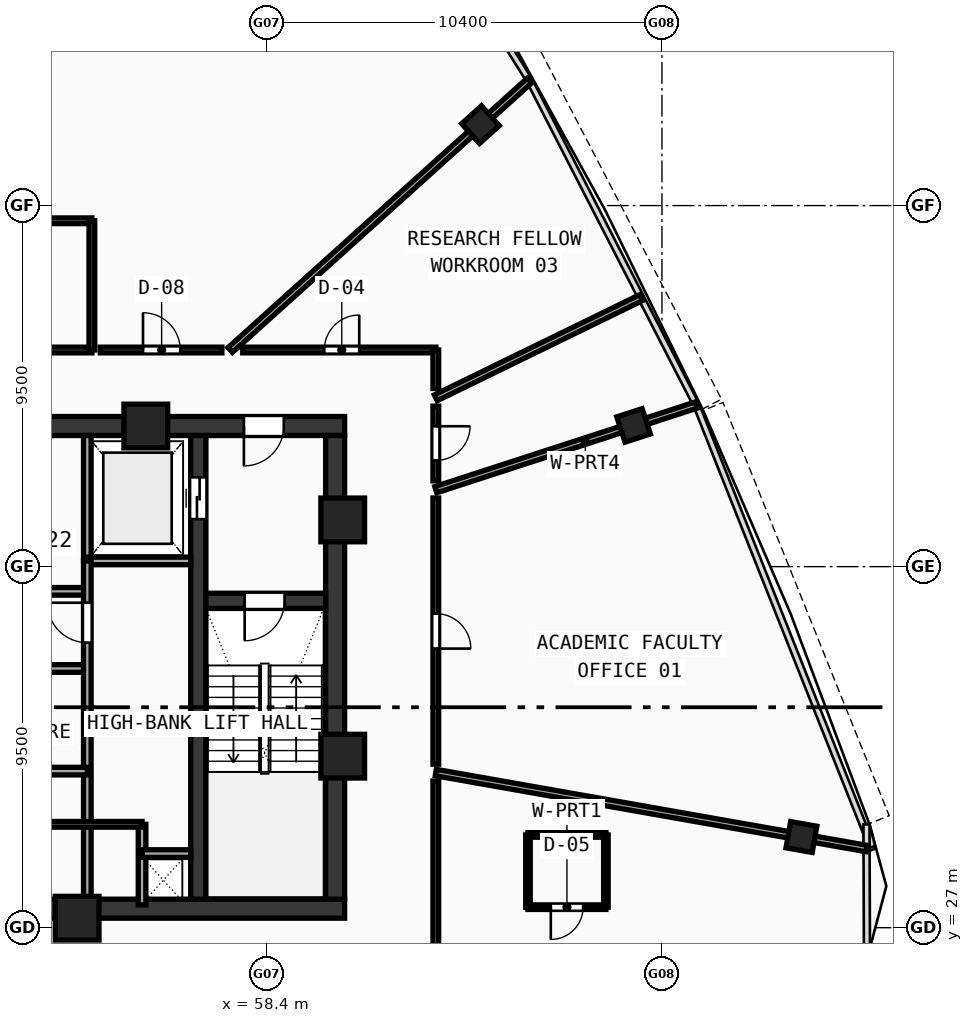
"""IFC4 building model, lengths in metres.
Left out: names, types, materials, properties, quantities, classifications, styles, units other than length and angle.
Written with IfcOpenShell. Run it as: python <this file> out.ifc"""

import sys

from ifc_helpers import new_model, si_unit, direction, frame, frame_2d, origin, origin_with_axes, origin_2d, place, context, subcontext, project, spatial, rectangle, hollow_rectangle, extrude, source, transform, mapped, element, fill, save


model = new_model("IFC4")
c1 = context("Model", 3, precision=1e-05, world=origin(), true_north=direction((0.0, 1.0)))
c2 = subcontext(c1, "Body", "Model", "MODEL_VIEW")
j1 = project(units=[si_unit("LENGTHUNIT", "METRE"), si_unit("PLANEANGLEUNIT", "RADIAN")], contexts=[c1])
p1 = place(None, origin())
s1 = spatial("IfcSite", under=j1, at=p1, CompositionType="ELEMENT")
p2 = place(p1, origin())
s2 = spatial("IfcBuilding", under=s1, at=p2, CompositionType="ELEMENT")
p3 = place(p2, frame((0.0, 0.0, 363.01)))
s3 = spatial("IfcBuildingStorey", under=s2, at=p3, CompositionType="ELEMENT", Elevation=363.01)
p4 = place(p3, frame((35.55, 27.5, 0.0), z_axis=(0.0, 0.0, 1.0), x_axis=(1.0, 0.0, 0.0)))
e1 = element("IfcWall", 1, at=p4, inside=s3, PredefinedType="SHEAR", context=c2, shape_type="SweptSolid", body=[
    extrude(rectangle(XDim=24.9, YDim=0.5, at=frame_2d((12.45, 0.0))), origin(), (0.0, 0.0, 1.0), 3.47),
])
p5 = place(p3, frame((49.2, 40.2, 0.0), z_axis=(0.0, 0.0, 1.0), x_axis=(1.0, 0.0, 0.0)))
e2 = element("IfcWall", 2, at=p5, inside=s3, PredefinedType="SHEAR", context=c2, shape_type="SweptSolid", body=[
    extrude(rectangle(XDim=11.25, YDim=0.5, at=frame_2d((5.625, 0.0))), origin(), (0.0, 0.0, 1.0), 3.47),
])
p6 = place(p5, frame((8.6, 0.0, 0.0)))
e3 = element("IfcOpeningElement", 3, at=p6, cuts=e2, PredefinedType="OPENING", context=c2, shape_type="SweptSolid", body=[
    extrude(rectangle(XDim=1.05, YDim=2.1, at=frame_2d((0.525, 1.05))), frame((0.0, 0.26, 0.0), z_axis=(0.0, -1.0, 0.0), x_axis=(1.0, 0.0, 0.0)), (0.0, 0.0, 1.0), 0.52),
])
p7 = place(p3, frame((60.2, 27.75, 0.0), z_axis=(0.0, 0.0, 1.0), x_axis=(0.0, 1.0, 0.0)))
e4 = element("IfcWall", 4, at=p7, inside=s3, PredefinedType="SHEAR", context=c2, shape_type="SweptSolid", body=[
    extrude(rectangle(XDim=12.2, YDim=0.5, at=frame_2d((6.1, 0.0))), origin(), (0.0, 0.0, 1.0), 3.47),
])
p8 = place(p3, frame((56.6, 27.75, 0.0), z_axis=(0.0, 0.0, 1.0), x_axis=(0.0, 1.0, 0.0)))
e5 = element("IfcWall", 5, at=p8, inside=s3, PredefinedType="SHEAR", context=c2, shape_type="SweptSolid", body=[
    extrude(rectangle(XDim=12.2, YDim=0.4, at=frame_2d((6.1, 0.0))), origin(), (0.0, 0.0, 1.0), 3.47),
])
p9 = place(p8, frame((10.0, 0.0, 0.0)))
e6 = element("IfcOpeningElement", 6, at=p9, cuts=e5, PredefinedType="OPENING", context=c2, shape_type="SweptSolid", body=[
    extrude(rectangle(XDim=1.1, YDim=2.1, at=frame_2d((0.55, 1.05))), frame((0.0, 0.21, 0.0), z_axis=(0.0, -1.0, 0.0), x_axis=(1.0, 0.0, 0.0)), (0.0, 0.0, 1.0), 0.42),
])
p10 = place(p3, frame((56.8, 35.6, 0.0), z_axis=(0.0, 0.0, 1.0), x_axis=(1.0, 0.0, 0.0)))
e7 = element("IfcWall", 7, at=p10, inside=s3, PredefinedType="SHEAR", context=c2, shape_type="SweptSolid", body=[
    extrude(rectangle(XDim=3.15, YDim=0.4, at=frame_2d((1.575, 0.0))), origin(), (0.0, 0.0, 1.0), 3.47),
])
p11 = place(p10, frame((1.02, 0.0, 0.0)))
e8 = element("IfcOpeningElement", 8, at=p11, cuts=e7, PredefinedType="OPENING", context=c2, shape_type="SweptSolid", body=[
    extrude(rectangle(XDim=1.05, YDim=2.1, at=frame_2d((0.525, 1.05))), frame((0.0, 0.21, 0.0), z_axis=(0.0, -1.0, 0.0), x_axis=(1.0, 0.0, 0.0)), (0.0, 0.0, 1.0), 0.42),
])
m1 = source(origin(), c2, "Body", "SweptSolid", [
    extrude(hollow_rectangle(XDim=1.15, YDim=1.15, WallThickness=0.048, at=origin_2d()), origin(), (0.0, 0.0, 1.0), 3.73),
])
for number, where, z_axis, x_axis in (
    (9, (53.412, 27.25, -0.26), (0.0, 0.0, 1.0), (1.0, 0.0, 0.0)),
    (10, (60.4, 31.513, -0.26), (0.0, 0.0, 1.0), (1.0, 0.0, 0.0)),
    (11, (60.4, 37.729, -0.26), (0.0, 0.0, 1.0), (1.0, 0.0, 0.0)),
    (12, (55.219, 40.2, -0.26), (0.0, 0.0, 1.0), (1.0, 0.0, 0.0)),
):
    element("IfcColumn", number, at=place(p3, frame(where, z_axis=z_axis, x_axis=x_axis)), inside=s3, PredefinedType="COLUMN", context=c2, shape_type="MappedRepresentation", body=[
        mapped(m1, transform((0.0, 0.0, 0.0), scale=1.0)),
    ])
m2 = source(origin(), c2, "Body", "SweptSolid", [
    extrude(hollow_rectangle(XDim=0.7, YDim=0.7, WallThickness=0.026, at=origin_2d()), origin(), (0.0, 0.0, 1.0), 3.73),
])
for number, where, z_axis, x_axis in (
    (13, (72.47, 29.385, -0.26), (0.0, 0.0, 1.0), (0.174, 0.985, 0.0)),
    (14, (68.053, 40.216, -0.26), (0.0, 0.0, 1.0), (-0.309, 0.951, 0.0)),
    (15, (64.025, 48.129, -0.26), (0.0, 0.0, 1.0), (-0.669, 0.743, 0.0)),
):
    element("IfcColumn", number, at=place(p3, frame(where, z_axis=z_axis, x_axis=x_axis)), inside=s3, PredefinedType="COLUMN", context=c2, shape_type="MappedRepresentation", body=[
        mapped(m2, transform((0.0, 0.0, 0.0), scale=1.0)),
    ])
p12 = place(p3, frame((53.68, 36.65, 0.0), z_axis=(0.0, 0.0, 1.0), x_axis=(0.0, 1.0, 0.0)))
e16 = element("IfcWall", 16, at=p12, inside=s3, PredefinedType="SOLIDWALL", context=c2, shape_type="SweptSolid", body=[
    extrude(rectangle(XDim=3.3, YDim=0.2, at=frame_2d((1.65, 0.0))), origin(), (0.0, 0.0, 1.0), 3.47),
])
p13 = place(p3, frame((53.68, 36.65, 0.0), z_axis=(0.0, 0.0, 1.0), x_axis=(1.0, 0.0, 0.0)))
e17 = element("IfcWall", 17, at=p13, inside=s3, PredefinedType="SOLIDWALL", context=c2, shape_type="SweptSolid", body=[
    extrude(rectangle(XDim=2.72, YDim=0.2, at=frame_2d((1.36, 0.0))), origin(), (0.0, 0.0, 1.0), 3.47),
])
p14 = place(p3, frame((48.95, 35.85, 0.0), z_axis=(0.0, 0.0, 1.0), x_axis=(1.0, 0.0, 0.0)))
e18 = element("IfcWall", 18, at=p14, inside=s3, PredefinedType="SOLIDWALL", context=c2, shape_type="SweptSolid", body=[
    extrude(rectangle(XDim=4.73, YDim=0.2, at=frame_2d((2.365, 0.0))), origin(), (0.0, 0.0, 1.0), 3.47),
])
p15 = place(p14, frame((1.8, 0.0, 0.0)))
e19 = element("IfcOpeningElement", 19, at=p15, cuts=e18, PredefinedType="OPENING", context=c2, shape_type="SweptSolid", body=[
    extrude(rectangle(XDim=0.9, YDim=2.1, at=frame_2d((0.45, 1.05))), frame((0.0, 0.11, 0.0), z_axis=(0.0, -1.0, 0.0), x_axis=(1.0, 0.0, 0.0)), (0.0, 0.0, 1.0), 0.22),
])
p16 = place(p3, frame((43.85, 33.82, 0.0), z_axis=(0.0, 0.0, 1.0), x_axis=(1.0, 0.0, 0.0)))
e20 = element("IfcWall", 20, at=p16, inside=s3, PredefinedType="SOLIDWALL", context=c2, shape_type="SweptSolid", body=[
    extrude(rectangle(XDim=9.83, YDim=0.2, at=frame_2d((4.915, 0.0))), origin(), (0.0, 0.0, 1.0), 3.47),
])
p17 = place(p16, frame((1.2, 0.0, 0.0)))
e21 = element("IfcOpeningElement", 21, at=p17, cuts=e20, PredefinedType="OPENING", context=c2, shape_type="SweptSolid", body=[
    extrude(rectangle(XDim=0.9, YDim=2.1, at=frame_2d((0.45, 1.05))), frame((0.0, 0.11, 0.0), z_axis=(0.0, -1.0, 0.0), x_axis=(1.0, 0.0, 0.0)), (0.0, 0.0, 1.0), 0.22),
])
p18 = place(p16, frame((4.6, 0.0, 0.0)))
e22 = element("IfcOpeningElement", 22, at=p18, cuts=e20, PredefinedType="OPENING", context=c2, shape_type="SweptSolid", body=[
    extrude(rectangle(XDim=0.9, YDim=2.1, at=frame_2d((0.45, 1.05))), frame((0.0, 0.11, 0.0), z_axis=(0.0, -1.0, 0.0), x_axis=(1.0, 0.0, 0.0)), (0.0, 0.0, 1.0), 0.22),
])
p19 = place(p3, frame((53.68, 27.6, 0.0), z_axis=(0.0, 0.0, 1.0), x_axis=(0.0, 1.0, 0.0)))
e23 = element("IfcWall", 23, at=p19, inside=s3, PredefinedType="SOLIDWALL", context=c2, shape_type="SweptSolid", body=[
    extrude(rectangle(XDim=9.05, YDim=0.2, at=frame_2d((4.525, 0.0))), origin(), (0.0, 0.0, 1.0), 3.47),
])
p20 = place(p19, frame((6.9, 0.0, 0.0)))
e24 = element("IfcOpeningElement", 24, at=p20, cuts=e23, PredefinedType="OPENING", context=c2, shape_type="SweptSolid", body=[
    extrude(rectangle(XDim=1.05, YDim=2.1, at=frame_2d((0.525, 1.05))), frame((0.0, 0.11, 0.0), z_axis=(0.0, -1.0, 0.0), x_axis=(1.0, 0.0, 0.0)), (0.0, 0.0, 1.0), 0.22),
])
p21 = place(p3, frame((43.85, 31.12, 0.0), z_axis=(0.0, 0.0, 1.0), x_axis=(1.0, 0.0, 0.0)))
e25 = element("IfcWall", 25, at=p21, inside=s3, PredefinedType="SOLIDWALL", context=c2, shape_type="SweptSolid", body=[
    extrude(rectangle(XDim=9.83, YDim=0.2, at=frame_2d((4.915, 0.0))), origin(), (0.0, 0.0, 1.0), 3.47),
])
p22 = place(p3, frame((55.12, 27.6, 0.0), z_axis=(0.0, 0.0, 1.0), x_axis=(0.0, 1.0, 0.0)))
e26 = element("IfcWall", 26, at=p22, inside=s3, PredefinedType="SOLIDWALL", context=c2, shape_type="SweptSolid", body=[
    extrude(rectangle(XDim=2.12, YDim=0.2, at=frame_2d((1.06, 0.0))), origin(), (0.0, 0.0, 1.0), 3.47),
])
p23 = place(p3, frame((55.12, 28.95, 0.0), z_axis=(0.0, 0.0, 1.0), x_axis=(1.0, 0.0, 0.0)))
e27 = element("IfcWall", 27, at=p23, inside=s3, PredefinedType="SOLIDWALL", context=c2, shape_type="SweptSolid", body=[
    extrude(rectangle(XDim=1.28, YDim=0.2, at=frame_2d((0.64, 0.0))), origin(), (0.0, 0.0, 1.0), 3.47),
])
p24 = place(p3, frame((51.05, 29.72, 0.0), z_axis=(0.0, 0.0, 1.0), x_axis=(1.0, 0.0, 0.0)))
e28 = element("IfcWall", 28, at=p24, inside=s3, PredefinedType="PARTITIONING", context=c2, shape_type="SweptSolid", body=[
    extrude(rectangle(XDim=4.07, YDim=0.15, at=frame_2d((2.035, 0.0))), origin(), (0.0, 0.0, 1.0), 3.47),
])
p25 = place(p24, frame((0.5, 0.0, 0.0)))
e29 = element("IfcOpeningElement", 29, at=p25, cuts=e28, PredefinedType="OPENING", context=c2, shape_type="SweptSolid", body=[
    extrude(rectangle(XDim=0.9, YDim=2.1, at=frame_2d((0.45, 1.05))), frame((0.0, 0.085, 0.0), z_axis=(0.0, -1.0, 0.0), x_axis=(1.0, 0.0, 0.0)), (0.0, 0.0, 1.0), 0.17),
])
p26 = place(p3, frame((48.9, 42.2, 0.0), z_axis=(0.0, 0.0, 1.0), x_axis=(1.0, 0.0, 0.0)))
e30 = element("IfcWall", 30, at=p26, inside=s3, PredefinedType="PARTITIONING", context=c2, shape_type="SweptSolid", body=[
    extrude(rectangle(XDim=4.9, YDim=0.15, at=frame_2d((2.45, 0.0))), origin(), (0.0, 0.0, 1.0), 2.87),
])
p27 = place(p26, frame((1.4, 0.0, 0.0)))
e31 = element("IfcOpeningElement", 31, at=p27, cuts=e30, PredefinedType="OPENING", context=c2, shape_type="SweptSolid", body=[
    extrude(rectangle(XDim=0.94, YDim=2.1, at=frame_2d((0.47, 1.05))), frame((0.0, 0.085, 0.0), z_axis=(0.0, -1.0, 0.0), x_axis=(1.0, 0.0, 0.0)), (0.0, 0.0, 1.0), 0.17),
])
p28 = place(p3, frame((48.9, 45.6, 0.0), z_axis=(0.0, 0.0, 1.0), x_axis=(1.0, 0.0, 0.0)))
e32 = element("IfcWall", 32, at=p28, inside=s3, PredefinedType="PARTITIONING", context=c2, shape_type="SweptSolid", body=[
    extrude(rectangle(XDim=4.9, YDim=0.15, at=frame_2d((2.45, 0.0))), origin(), (0.0, 0.0, 1.0), 2.87),
])
p29 = place(p3, frame((53.8, 42.2, 0.0), z_axis=(0.0, 0.0, 1.0), x_axis=(0.0, 1.0, 0.0)))
e33 = element("IfcWall", 33, at=p29, inside=s3, PredefinedType="PARTITIONING", context=c2, shape_type="SweptSolid", body=[
    extrude(rectangle(XDim=3.4, YDim=0.15, at=frame_2d((1.7, 0.0))), origin(), (0.0, 0.0, 1.0), 3.47),
])
p30 = place(p3, frame((62.85, 38.525, 0.0), z_axis=(0.0, 0.0, 1.0), x_axis=(0.951060950279, 0.309003347644, 0.0)))
e34 = element("IfcWall", 34, at=p30, inside=s3, PredefinedType="PARTITIONING", context=c2, shape_type="SweptSolid", body=[
    extrude(rectangle(XDim=7.207, YDim=0.17, at=frame_2d((3.604, 0.0))), origin(), (0.0, 0.0, 1.0), 2.87),
])
p31 = place(p3, frame((62.85, 40.943, 0.0), z_axis=(0.0, 0.0, 1.0), x_axis=(0.898803189206, 0.438352400557, 0.0)))
e35 = element("IfcWall", 35, at=p31, inside=s3, PredefinedType="PARTITIONING", context=c2, shape_type="SweptSolid", body=[
    extrude(rectangle(XDim=6.01, YDim=0.17, at=frame_2d((3.005, 0.0))), origin(), (0.0, 0.0, 1.0), 2.87),
])
p32 = place(p3, frame((57.44, 42.2, 0.0), z_axis=(0.0, 0.0, 1.0), x_axis=(0.743152066897, 0.66912256386, 0.0)))
e36 = element("IfcWall", 36, at=p32, inside=s3, PredefinedType="PARTITIONING", context=c2, shape_type="SweptSolid", body=[
    extrude(rectangle(XDim=10.596, YDim=0.17, at=frame_2d((5.298, 0.0))), origin(), (0.0, 0.0, 1.0), 2.87),
])
p33 = place(p3, frame((62.85, 31.082, 0.0), z_axis=(0.0, 0.0, 1.0), x_axis=(0.984809380036, -0.173638950101, 0.0)))
e37 = element("IfcWall", 37, at=p33, inside=s3, PredefinedType="PARTITIONING", context=c2, shape_type="SweptSolid", body=[
    extrude(rectangle(XDim=11.512, YDim=0.17, at=frame_2d((5.756, 0.0))), origin(), (0.0, 0.0, 1.0), 2.87),
])
p34 = place(p3, frame((54.02, 42.2, 0.0), z_axis=(0.0, 0.0, 1.0), x_axis=(1.0, 0.0, 0.0)))
e38 = element("IfcWall", 38, at=p34, inside=s3, PredefinedType="PARTITIONING", context=c2, shape_type="SweptSolid", body=[
    extrude(rectangle(XDim=3.2, YDim=0.15, at=frame_2d((1.6, 0.0))), origin(), (0.0, 0.0, 1.0), 2.87),
])
p35 = place(p34, frame((1.125, 0.0, 0.0)))
e39 = element("IfcOpeningElement", 39, at=p35, cuts=e38, PredefinedType="OPENING", context=c2, shape_type="SweptSolid", body=[
    extrude(rectangle(XDim=0.98, YDim=2.12, at=frame_2d((0.49, 1.06))), frame((0.0, 0.085, 0.0), z_axis=(0.0, -1.0, 0.0), x_axis=(1.0, 0.0, 0.0)), (0.0, 0.0, 1.0), 0.17),
])
p36 = place(p3, frame((57.769, 42.2, 0.0), z_axis=(0.0, 0.0, 1.0), x_axis=(1.0, 0.0, 0.0)))
e40 = element("IfcWall", 40, at=p36, inside=s3, PredefinedType="PARTITIONING", context=c2, shape_type="SweptSolid", body=[
    extrude(rectangle(XDim=5.081, YDim=0.15, at=frame_2d((2.541, 0.0))), origin(), (0.0, 0.0, 1.0), 3.12),
])
p37 = place(p36, frame((2.146, 0.0, 0.0)))
e41 = element("IfcOpeningElement", 41, at=p37, cuts=e40, PredefinedType="OPENING", context=c2, shape_type="SweptSolid", body=[
    extrude(rectangle(XDim=0.92, YDim=2.1, at=frame_2d((0.46, 1.05))), frame((0.0, 0.085, 0.0), z_axis=(0.0, -1.0, 0.0), x_axis=(1.0, 0.0, 0.0)), (0.0, 0.0, 1.0), 0.17),
])
p38 = place(p3, frame((62.85, 42.2, 0.0), z_axis=(0.0, 0.0, 1.0), x_axis=(0.0, -1.0, 0.0)))
e42 = element("IfcWall", 42, at=p38, inside=s3, PredefinedType="PARTITIONING", context=c2, shape_type="SweptSolid", body=[
    extrude(rectangle(XDim=1.012, YDim=0.15, at=frame_2d((0.506, 0.0))), origin(), (0.0, 0.0, 1.0), 3.47),
])
p39 = place(p3, frame((62.85, 40.723, 0.0), z_axis=(0.0, 0.0, 1.0), x_axis=(0.0, -1.0, 0.0)))
e43 = element("IfcWall", 43, at=p39, inside=s3, PredefinedType="PARTITIONING", context=c2, shape_type="SweptSolid", body=[
    extrude(rectangle(XDim=1.967, YDim=0.15, at=frame_2d((0.983, 0.0))), origin(), (0.0, 0.0, 1.0), 3.12),
])
p40 = place(p39, frame((0.529, 0.0, 0.0)))
e44 = element("IfcOpeningElement", 44, at=p40, cuts=e43, PredefinedType="OPENING", context=c2, shape_type="SweptSolid", body=[
    extrude(rectangle(XDim=0.9, YDim=2.08, at=frame_2d((0.45, 1.04))), frame((0.0, 0.085, 0.0), z_axis=(0.0, -1.0, 0.0), x_axis=(1.0, 0.0, 0.0)), (0.0, 0.0, 1.0), 0.17),
])
p41 = place(p3, frame((62.85, 38.305, 0.0), z_axis=(0.0, 0.0, 1.0), x_axis=(0.0, -1.0, 0.0)))
e45 = element("IfcWall", 45, at=p41, inside=s3, PredefinedType="PARTITIONING", context=c2, shape_type="SweptSolid", body=[
    extrude(rectangle(XDim=7.004, YDim=0.15, at=frame_2d((3.502, 0.0))), origin(), (0.0, 0.0, 1.0), 3.47),
])
p42 = place(p41, frame((3.042, 0.0, 0.0)))
e46 = element("IfcOpeningElement", 46, at=p42, cuts=e45, PredefinedType="OPENING", context=c2, shape_type="SweptSolid", body=[
    extrude(rectangle(XDim=0.92, YDim=2.1, at=frame_2d((0.46, 1.05))), frame((0.0, 0.085, 0.0), z_axis=(0.0, -1.0, 0.0), x_axis=(1.0, 0.0, 0.0)), (0.0, 0.0, 1.0), 0.17),
])
p43 = place(p3, frame((62.85, 30.858, 0.0), z_axis=(0.0, 0.0, 1.0), x_axis=(0.0, -1.0, 0.0)))
e47 = element("IfcWall", 47, at=p43, inside=s3, PredefinedType="PARTITIONING", context=c2, shape_type="SweptSolid", body=[
    extrude(rectangle(XDim=5.958, YDim=0.15, at=frame_2d((2.979, 0.0))), origin(), (0.0, 0.0, 1.0), 2.87),
])
p44 = place(p3, frame((65.275, 27.54, 0.0), z_axis=(0.0, 0.0, 1.0), x_axis=(1.0, 0.0, 0.0)))
e48 = element("IfcWall", 48, at=p44, inside=s3, PredefinedType="PARTITIONING", context=c2, shape_type="SweptSolid", body=[
    extrude(rectangle(XDim=2.05, YDim=0.12, at=frame_2d((1.025, 0.0))), origin(), (0.0, 0.0, 1.0), 2.87),
])
p45 = place(p44, frame((0.6, 0.0, 0.0)))
e49 = element("IfcOpeningElement", 49, at=p45, cuts=e48, PredefinedType="OPENING", context=c2, shape_type="SweptSolid", body=[
    extrude(rectangle(XDim=0.85, YDim=2.1, at=frame_2d((0.425, 1.05))), frame((0.0, 0.07, 0.0), z_axis=(0.0, -1.0, 0.0), x_axis=(1.0, 0.0, 0.0)), (0.0, 0.0, 1.0), 0.14),
])
p46 = place(p3, frame((67.325, 27.54, 0.0), z_axis=(0.0, 0.0, 1.0), x_axis=(0.0, 1.0, 0.0)))
e50 = element("IfcWall", 50, at=p46, inside=s3, PredefinedType="PARTITIONING", context=c2, shape_type="SweptSolid", body=[
    extrude(rectangle(XDim=1.9, YDim=0.12, at=frame_2d((0.95, 0.0))), origin(), (0.0, 0.0, 1.0), 2.87),
])
p47 = place(p3, frame((67.325, 29.44, 0.0), z_axis=(0.0, 0.0, 1.0), x_axis=(-1.0, 0.0, 0.0)))
e51 = element("IfcWall", 51, at=p47, inside=s3, PredefinedType="PARTITIONING", context=c2, shape_type="SweptSolid", body=[
    extrude(rectangle(XDim=2.05, YDim=0.12, at=frame_2d((1.025, 0.0))), origin(), (0.0, 0.0, 1.0), 3.47),
])
p48 = place(p3, frame((65.275, 29.44, 0.0), z_axis=(0.0, 0.0, 1.0), x_axis=(0.0, -1.0, 0.0)))
e52 = element("IfcWall", 52, at=p48, inside=s3, PredefinedType="PARTITIONING", context=c2, shape_type="SweptSolid", body=[
    extrude(rectangle(XDim=1.9, YDim=0.12, at=frame_2d((0.95, 0.0))), origin(), (0.0, 0.0, 1.0), 3.47),
])
m3 = source(origin(), c2, "Body", "SweptSolid", [
    extrude(rectangle(XDim=1.05, YDim=2.1, at=frame_2d((0.525, 1.05))), frame((0.0, 0.025, 0.0), z_axis=(0.0, -1.0, 0.0), x_axis=(1.0, 0.0, 0.0)), (0.0, 0.0, 1.0), 0.05),
])
p49 = place(p11, frame((1.05, 0.0, 0.0), z_axis=(0.0, 0.0, 1.0), x_axis=(-1.0, 0.0, 0.0)))
e53 = element("IfcDoor", 53, at=p49, inside=s3, OperationType="SINGLE_SWING_RIGHT", PredefinedType="DOOR", context=c2, shape_type="MappedRepresentation", body=[
    mapped(m3, transform((0.0, 0.0, 0.0), scale=1.0)),
])
fill(e8, e53)
p50 = place(p6, frame((1.05, 0.0, 0.0), z_axis=(0.0, 0.0, 1.0), x_axis=(-1.0, 0.0, 0.0)))
e54 = element("IfcDoor", 54, at=p50, inside=s3, OperationType="SINGLE_SWING_RIGHT", PredefinedType="DOOR", context=c2, shape_type="MappedRepresentation", body=[
    mapped(m3, transform((0.0, 0.0, 0.0), scale=1.0)),
])
fill(e3, e54)
m4 = source(origin(), c2, "Body", "SweptSolid", [
    extrude(rectangle(XDim=1.1, YDim=2.1, at=frame_2d((0.55, 1.05))), frame((0.0, 0.025, 0.0), z_axis=(0.0, -1.0, 0.0), x_axis=(1.0, 0.0, 0.0)), (0.0, 0.0, 1.0), 0.05),
])
p51 = place(p9, origin_with_axes())
e55 = element("IfcDoor", 55, at=p51, inside=s3, OperationType="DOUBLE_DOOR_SLIDING", PredefinedType="DOOR", context=c2, shape_type="MappedRepresentation", body=[
    mapped(m4, transform((0.0, 0.0, 0.0), scale=1.0)),
])
fill(e6, e55)
p52 = place(p20, origin_with_axes())
e56 = element("IfcDoor", 56, at=p52, inside=s3, OperationType="SINGLE_SWING_RIGHT", PredefinedType="DOOR", context=c2, shape_type="MappedRepresentation", body=[
    mapped(m3, transform((0.0, 0.0, 0.0), scale=1.0)),
])
fill(e24, e56)
m5 = source(origin(), c2, "Body", "SweptSolid", [
    extrude(rectangle(XDim=0.92, YDim=2.1, at=frame_2d((0.46, 1.05))), frame((0.0, 0.025, 0.0), z_axis=(0.0, -1.0, 0.0), x_axis=(1.0, 0.0, 0.0)), (0.0, 0.0, 1.0), 0.05),
])
p53 = place(p42, origin_with_axes())
e57 = element("IfcDoor", 57, at=p53, inside=s3, OperationType="SINGLE_SWING_RIGHT", PredefinedType="DOOR", context=c2, shape_type="MappedRepresentation", body=[
    mapped(m5, transform((0.0, 0.0, 0.0), scale=1.0)),
])
fill(e46, e57)
m6 = source(origin(), c2, "Body", "SweptSolid", [
    extrude(rectangle(XDim=0.9, YDim=2.08, at=frame_2d((0.45, 1.04))), frame((0.0, 0.025, 0.0), z_axis=(0.0, -1.0, 0.0), x_axis=(1.0, 0.0, 0.0)), (0.0, 0.0, 1.0), 0.05),
])
p54 = place(p40, origin_with_axes())
e58 = element("IfcDoor", 58, at=p54, inside=s3, OperationType="SINGLE_SWING_LEFT", PredefinedType="DOOR", context=c2, shape_type="MappedRepresentation", body=[
    mapped(m6, transform((0.0, 0.0, 0.0), scale=1.0)),
])
fill(e44, e58)
p55 = place(p37, origin_with_axes())
e59 = element("IfcDoor", 59, at=p55, inside=s3, OperationType="SINGLE_SWING_RIGHT", PredefinedType="DOOR", context=c2, shape_type="MappedRepresentation", body=[
    mapped(m5, transform((0.0, 0.0, 0.0), scale=1.0)),
])
fill(e41, e59)
m7 = source(origin(), c2, "Body", "SweptSolid", [
    extrude(rectangle(XDim=0.98, YDim=2.12, at=frame_2d((0.49, 1.06))), frame((0.0, 0.025, 0.0), z_axis=(0.0, -1.0, 0.0), x_axis=(1.0, 0.0, 0.0)), (0.0, 0.0, 1.0), 0.05),
])
p56 = place(p35, origin_with_axes())
e60 = element("IfcDoor", 60, at=p56, inside=s3, OperationType="SINGLE_SWING_LEFT", PredefinedType="DOOR", context=c2, shape_type="MappedRepresentation", body=[
    mapped(m7, transform((0.0, 0.0, 0.0), scale=1.0)),
])
fill(e39, e60)
m8 = source(origin(), c2, "Body", "SweptSolid", [
    extrude(rectangle(XDim=0.85, YDim=2.1, at=frame_2d((0.425, 1.05))), frame((0.0, 0.025, 0.0), z_axis=(0.0, -1.0, 0.0), x_axis=(1.0, 0.0, 0.0)), (0.0, 0.0, 1.0), 0.05),
])
p57 = place(p45, frame((0.85, 0.0, 0.0), z_axis=(0.0, 0.0, 1.0), x_axis=(-1.0, 0.0, 0.0)))
e61 = element("IfcDoor", 61, at=p57, inside=s3, OperationType="SINGLE_SWING_RIGHT", PredefinedType="DOOR", context=c2, shape_type="MappedRepresentation", body=[
    mapped(m8, transform((0.0, 0.0, 0.0), scale=1.0)),
])
fill(e49, e61)
save(model, sys.argv[1])
